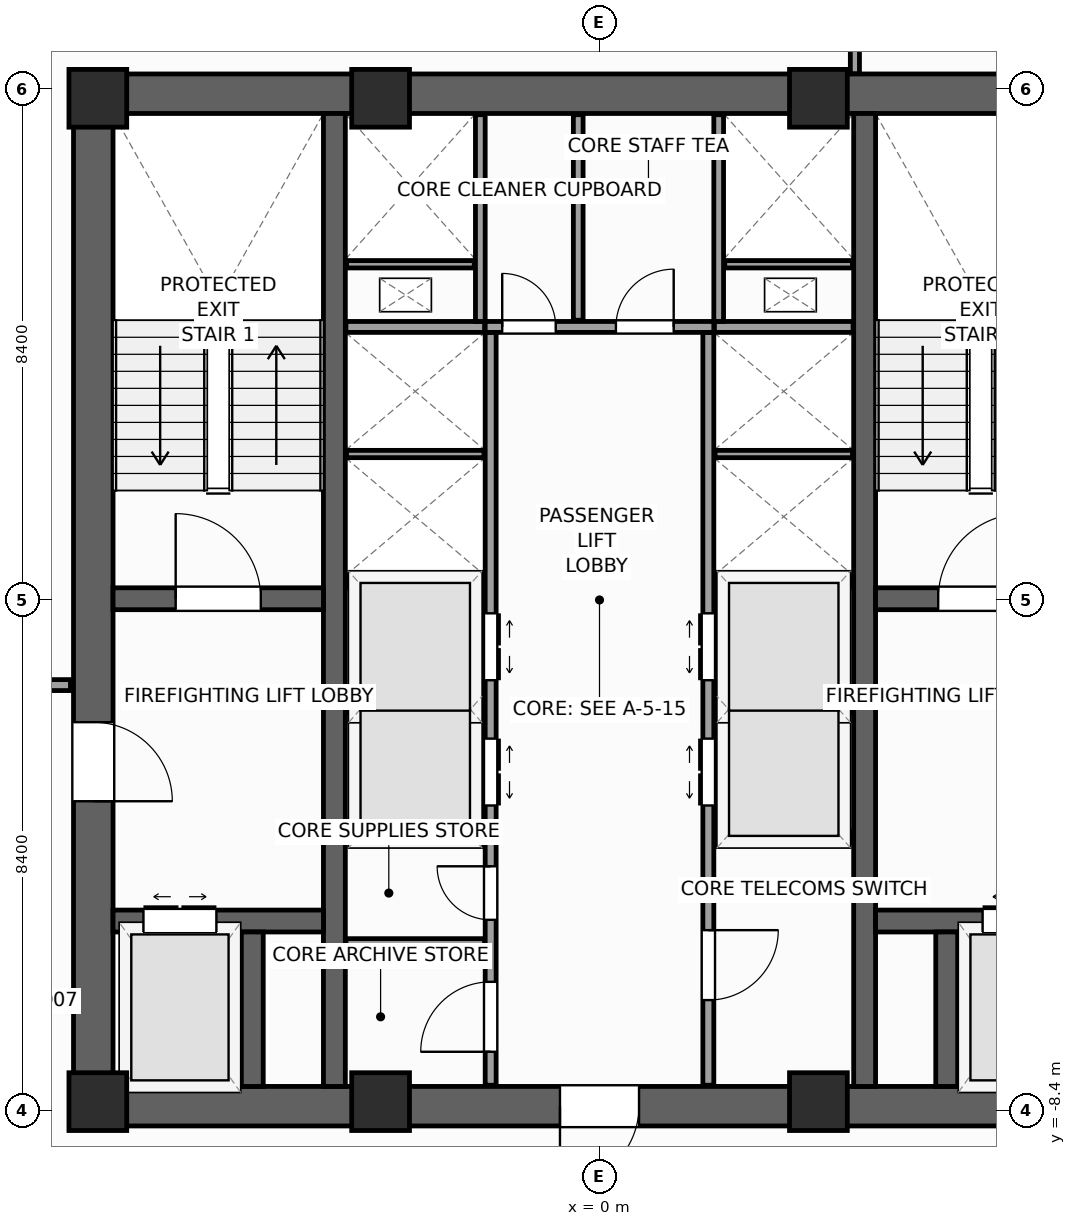
"""IFC4 building model, lengths in metres.
Left out: names, types, materials, properties, quantities, classifications, styles, units other than length and angle.
Written with IfcOpenShell. Run it as: python <this file> out.ifc"""

import sys

from ifc_helpers import new_model, si_unit, direction, frame, frame_2d, origin, origin_2d, place, context, subcontext, project, spatial, rectangle, extrude, source, transform, mapped, element, fill, save


model = new_model("IFC4")
c1 = context("Model", 3, precision=1e-05, world=origin(), true_north=direction((0.0, 1.0)))
c2 = subcontext(c1, "Body", "Model", "MODEL_VIEW")
j1 = project(units=[si_unit("LENGTHUNIT", "METRE"), si_unit("PLANEANGLEUNIT", "RADIAN")], contexts=[c1])
p1 = place(None, origin())
s1 = spatial("IfcSite", under=j1, at=p1, CompositionType="ELEMENT")
p2 = place(p1, origin())
s2 = spatial("IfcBuilding", under=s1, at=p2, CompositionType="ELEMENT")
p3 = place(p2, frame((0.0, 0.0, 168.4)))
s3 = spatial("IfcBuildingStorey", under=s2, at=p3, CompositionType="ELEMENT", Elevation=168.4)
p4 = place(p3, frame((-8.65, -8.325, 0.0), z_axis=(0.0, 0.0, 1.0), x_axis=(1.0, 0.0, 0.0)))
e1 = element("IfcWall", 1, at=p4, inside=s3, PredefinedType="SHEAR", context=c2, shape_type="SweptSolid", body=[
    extrude(rectangle(XDim=17.3, YDim=0.65, at=frame_2d((8.65, 0.0))), origin(), (0.0, 0.0, 1.0), 4.0),
])
p5 = place(p4, frame((8.0, 0.0, 0.0)))
e2 = element("IfcOpeningElement", 2, at=p5, cuts=e1, PredefinedType="OPENING", context=c2, shape_type="SweptSolid", body=[
    extrude(rectangle(XDim=1.3, YDim=2.2, at=frame_2d((0.65, 1.1))), frame((0.0, 0.335, 0.0), z_axis=(0.0, -1.0, 0.0), x_axis=(1.0, 0.0, 0.0)), (0.0, 0.0, 1.0), 0.67),
])
p6 = place(p3, frame((-8.65, 8.325, 0.0), z_axis=(0.0, 0.0, 1.0), x_axis=(1.0, 0.0, 0.0)))
e3 = element("IfcWall", 3, at=p6, inside=s3, PredefinedType="SHEAR", context=c2, shape_type="SweptSolid", body=[
    extrude(rectangle(XDim=17.3, YDim=0.65, at=frame_2d((8.65, 0.0))), origin(), (0.0, 0.0, 1.0), 4.0),
])
p7 = place(p3, frame((-8.325, -8.0, 0.0), z_axis=(0.0, 0.0, 1.0), x_axis=(0.0, 1.0, 0.0)))
e4 = element("IfcWall", 4, at=p7, inside=s3, PredefinedType="SHEAR", context=c2, shape_type="SweptSolid", body=[
    extrude(rectangle(XDim=16.0, YDim=0.65, at=frame_2d((8.0, 0.0))), origin(), (0.0, 0.0, 1.0), 4.0),
])
p8 = place(p7, frame((4.69, 0.0, 0.0)))
e5 = element("IfcOpeningElement", 5, at=p8, cuts=e4, PredefinedType="OPENING", context=c2, shape_type="SweptSolid", body=[
    extrude(rectangle(XDim=1.3, YDim=2.2, at=frame_2d((0.65, 1.1))), frame((0.0, 0.335, 0.0), z_axis=(0.0, -1.0, 0.0), x_axis=(1.0, 0.0, 0.0)), (0.0, 0.0, 1.0), 0.67),
])
for number, where, z_axis, x_axis in (
    (6, (-4.36, -8.0, 0.0), (0.0, 0.0, 1.0), (0.0, 1.0, 0.0)),
    (7, (4.36, -8.0, 0.0), (0.0, 0.0, 1.0), (0.0, 1.0, 0.0)),
):
    element("IfcWall", number, at=place(p3, frame(where, z_axis=z_axis, x_axis=x_axis)), inside=s3, PredefinedType="SHEAR", context=c2, shape_type="SweptSolid", body=[
        extrude(rectangle(XDim=16.0, YDim=0.36, at=frame_2d((8.0, 0.0))), origin(), (0.0, 0.0, 1.0), 4.0),
    ])
p9 = place(p3, frame((-8.0, 0.02, 0.0), z_axis=(0.0, 0.0, 1.0), x_axis=(1.0, 0.0, 0.0)))
e8 = element("IfcWall", 8, at=p9, inside=s3, PredefinedType="SHEAR", context=c2, shape_type="SweptSolid", body=[
    extrude(rectangle(XDim=3.46, YDim=0.36, at=frame_2d((1.73, 0.0))), origin(), (0.0, 0.0, 1.0), 4.0),
])
p10 = place(p9, frame((1.03, 0.0, 0.0)))
e9 = element("IfcOpeningElement", 9, at=p10, cuts=e8, PredefinedType="OPENING", context=c2, shape_type="SweptSolid", body=[
    extrude(rectangle(XDim=1.4, YDim=2.2, at=frame_2d((0.7, 1.1))), frame((0.0, 0.19, 0.0), z_axis=(0.0, -1.0, 0.0), x_axis=(1.0, 0.0, 0.0)), (0.0, 0.0, 1.0), 0.38),
])
p11 = place(p3, frame((4.54, 0.02, 0.0), z_axis=(0.0, 0.0, 1.0), x_axis=(1.0, 0.0, 0.0)))
e10 = element("IfcWall", 10, at=p11, inside=s3, PredefinedType="SHEAR", context=c2, shape_type="SweptSolid", body=[
    extrude(rectangle(XDim=3.46, YDim=0.36, at=frame_2d((1.73, 0.0))), origin(), (0.0, 0.0, 1.0), 4.0),
])
p12 = place(p11, frame((1.03, 0.0, 0.0)))
e11 = element("IfcOpeningElement", 11, at=p12, cuts=e10, PredefinedType="OPENING", context=c2, shape_type="SweptSolid", body=[
    extrude(rectangle(XDim=1.4, YDim=2.2, at=frame_2d((0.7, 1.1))), frame((0.0, 0.19, 0.0), z_axis=(0.0, -1.0, 0.0), x_axis=(1.0, 0.0, 0.0)), (0.0, 0.0, 1.0), 0.38),
])
p13 = place(p3, frame((-8.0, -5.28, 0.0), z_axis=(0.0, 0.0, 1.0), x_axis=(1.0, 0.0, 0.0)))
e12 = element("IfcWall", 12, at=p13, inside=s3, PredefinedType="SHEAR", context=c2, shape_type="SweptSolid", body=[
    extrude(rectangle(XDim=3.46, YDim=0.36, at=frame_2d((1.73, 0.0))), origin(), (0.0, 0.0, 1.0), 4.0),
])
p14 = place(p13, frame((0.5, 0.0, 0.0)))
e13 = element("IfcOpeningElement", 13, at=p14, cuts=e12, PredefinedType="OPENING", context=c2, shape_type="SweptSolid", body=[
    extrude(rectangle(XDim=1.2, YDim=2.25, at=frame_2d((0.6, 1.125))), frame((0.0, 0.19, 0.0), z_axis=(0.0, -1.0, 0.0), x_axis=(1.0, 0.0, 0.0)), (0.0, 0.0, 1.0), 0.38),
])
p15 = place(p3, frame((4.54, -5.28, 0.0), z_axis=(0.0, 0.0, 1.0), x_axis=(1.0, 0.0, 0.0)))
e14 = element("IfcWall", 14, at=p15, inside=s3, PredefinedType="SHEAR", context=c2, shape_type="SweptSolid", body=[
    extrude(rectangle(XDim=3.46, YDim=0.36, at=frame_2d((1.73, 0.0))), origin(), (0.0, 0.0, 1.0), 4.0),
])
p16 = place(p15, frame((1.76, 0.0, 0.0)))
e15 = element("IfcOpeningElement", 15, at=p16, cuts=e14, PredefinedType="OPENING", context=c2, shape_type="SweptSolid", body=[
    extrude(rectangle(XDim=1.2, YDim=2.25, at=frame_2d((0.6, 1.125))), frame((0.0, 0.19, 0.0), z_axis=(0.0, -1.0, 0.0), x_axis=(1.0, 0.0, 0.0)), (0.0, 0.0, 1.0), 0.38),
])
for number, where, z_axis, x_axis in (
    (16, (-5.71, -8.0, 0.0), (0.0, 0.0, 1.0), (0.0, 1.0, 0.0)),
    (17, (5.71, -8.0, 0.0), (0.0, 0.0, 1.0), (0.0, 1.0, 0.0)),
):
    element("IfcWall", number, at=place(p3, frame(where, z_axis=z_axis, x_axis=x_axis)), inside=s3, PredefinedType="SHEAR", context=c2, shape_type="SweptSolid", body=[
        extrude(rectangle(XDim=2.54, YDim=0.36, at=frame_2d((1.27, 0.0))), origin(), (0.0, 0.0, 1.0), 4.0),
    ])
m1 = source(origin(), c2, "Body", "SweptSolid", [
    extrude(rectangle(XDim=0.95, YDim=0.95, at=origin_2d()), origin(), (0.0, 0.0, 1.0), 4.0),
])
for number, where, z_axis, x_axis in (
    (18, (-8.25, -8.25, 0.0), (0.0, 0.0, 1.0), (1.0, 0.0, 0.0)),
    (19, (-8.25, 8.25, 0.0), (0.0, 0.0, 1.0), (1.0, 0.0, 0.0)),
    (20, (-3.6, -8.25, 0.0), (0.0, 0.0, 1.0), (1.0, 0.0, 0.0)),
    (21, (3.6, -8.25, 0.0), (0.0, 0.0, 1.0), (1.0, 0.0, 0.0)),
    (22, (-3.6, 8.25, 0.0), (0.0, 0.0, 1.0), (1.0, 0.0, 0.0)),
    (23, (3.6, 8.25, 0.0), (0.0, 0.0, 1.0), (1.0, 0.0, 0.0)),
):
    element("IfcColumn", number, at=place(p3, frame(where, z_axis=z_axis, x_axis=x_axis)), inside=s3, PredefinedType="PILASTER", context=c2, shape_type="MappedRepresentation", body=[
        mapped(m1, transform((0.0, 0.0, 0.0), scale=1.0)),
    ])
p17 = place(p3, frame((-1.79, -7.98, 0.0), z_axis=(0.0, 0.0, 1.0), x_axis=(0.0, 1.0, 0.0)))
e24 = element("IfcWall", 24, at=p17, inside=s3, PredefinedType="PARTITIONING", context=c2, shape_type="SweptSolid", body=[
    extrude(rectangle(XDim=12.38, YDim=0.18, at=frame_2d((6.19, 0.0))), origin(), (0.0, 0.0, 1.0), 3.74),
])
p18 = place(p17, frame((4.6, 0.0, 0.0)))
e25 = element("IfcOpeningElement", 25, at=p18, cuts=e24, PredefinedType="OPENING", context=c2, shape_type="SweptSolid", body=[
    extrude(rectangle(XDim=1.1, YDim=2.2, at=frame_2d((0.55, 1.1))), frame((0.0, 0.1, 0.0), z_axis=(0.0, -1.0, 0.0), x_axis=(1.0, 0.0, 0.0)), (0.0, 0.0, 1.0), 0.2),
])
p19 = place(p17, frame((6.66, 0.0, 0.0)))
e26 = element("IfcOpeningElement", 26, at=p19, cuts=e24, PredefinedType="OPENING", context=c2, shape_type="SweptSolid", body=[
    extrude(rectangle(XDim=1.1, YDim=2.2, at=frame_2d((0.55, 1.1))), frame((0.0, 0.1, 0.0), z_axis=(0.0, -1.0, 0.0), x_axis=(1.0, 0.0, 0.0)), (0.0, 0.0, 1.0), 0.2),
])
p20 = place(p17, frame((0.55, 0.0, 0.0)))
e27 = element("IfcOpeningElement", 27, at=p20, cuts=e24, PredefinedType="OPENING", context=c2, shape_type="SweptSolid", body=[
    extrude(rectangle(XDim=1.15, YDim=2.25, at=frame_2d((0.575, 1.125))), frame((0.0, 0.1, 0.0), z_axis=(0.0, -1.0, 0.0), x_axis=(1.0, 0.0, 0.0)), (0.0, 0.0, 1.0), 0.2),
])
p21 = place(p17, frame((2.72, 0.0, 0.0)))
e28 = element("IfcOpeningElement", 28, at=p21, cuts=e24, PredefinedType="OPENING", context=c2, shape_type="SweptSolid", body=[
    extrude(rectangle(XDim=0.88, YDim=2.1, at=frame_2d((0.44, 1.05))), frame((0.0, 0.1, 0.0), z_axis=(0.0, -1.0, 0.0), x_axis=(1.0, 0.0, 0.0)), (0.0, 0.0, 1.0), 0.2),
])
p22 = place(p3, frame((1.79, -7.98, 0.0), z_axis=(0.0, 0.0, 1.0), x_axis=(0.0, 1.0, 0.0)))
e29 = element("IfcWall", 29, at=p22, inside=s3, PredefinedType="PARTITIONING", context=c2, shape_type="SweptSolid", body=[
    extrude(rectangle(XDim=12.38, YDim=0.18, at=frame_2d((6.19, 0.0))), origin(), (0.0, 0.0, 1.0), 3.74),
])
p23 = place(p22, frame((4.6, 0.0, 0.0)))
e30 = element("IfcOpeningElement", 30, at=p23, cuts=e29, PredefinedType="OPENING", context=c2, shape_type="SweptSolid", body=[
    extrude(rectangle(XDim=1.1, YDim=2.2, at=frame_2d((0.55, 1.1))), frame((0.0, 0.1, 0.0), z_axis=(0.0, -1.0, 0.0), x_axis=(1.0, 0.0, 0.0)), (0.0, 0.0, 1.0), 0.2),
])
p24 = place(p22, frame((6.66, 0.0, 0.0)))
e31 = element("IfcOpeningElement", 31, at=p24, cuts=e29, PredefinedType="OPENING", context=c2, shape_type="SweptSolid", body=[
    extrude(rectangle(XDim=1.1, YDim=2.2, at=frame_2d((0.55, 1.1))), frame((0.0, 0.1, 0.0), z_axis=(0.0, -1.0, 0.0), x_axis=(1.0, 0.0, 0.0)), (0.0, 0.0, 1.0), 0.2),
])
p25 = place(p22, frame((1.4, 0.0, 0.0)))
e32 = element("IfcOpeningElement", 32, at=p25, cuts=e29, PredefinedType="OPENING", context=c2, shape_type="SweptSolid", body=[
    extrude(rectangle(XDim=1.15, YDim=2.25, at=frame_2d((0.575, 1.125))), frame((0.0, 0.1, 0.0), z_axis=(0.0, -1.0, 0.0), x_axis=(1.0, 0.0, 0.0)), (0.0, 0.0, 1.0), 0.2),
])
p26 = place(p3, frame((-1.88, 4.49, 0.0), z_axis=(0.0, 0.0, 1.0), x_axis=(1.0, 0.0, 0.0)))
e33 = element("IfcWall", 33, at=p26, inside=s3, PredefinedType="PARTITIONING", context=c2, shape_type="SweptSolid", body=[
    extrude(rectangle(XDim=3.76, YDim=0.18, at=frame_2d((1.88, 0.0))), origin(), (0.0, 0.0, 1.0), 3.74),
])
p27 = place(p26, frame((0.28, 0.0, 0.0)))
e34 = element("IfcOpeningElement", 34, at=p27, cuts=e33, PredefinedType="OPENING", context=c2, shape_type="SweptSolid", body=[
    extrude(rectangle(XDim=0.88, YDim=2.1, at=frame_2d((0.44, 1.05))), frame((0.0, 0.1, 0.0), z_axis=(0.0, -1.0, 0.0), x_axis=(1.0, 0.0, 0.0)), (0.0, 0.0, 1.0), 0.2),
])
p28 = place(p26, frame((2.15, 0.0, 0.0)))
e35 = element("IfcOpeningElement", 35, at=p28, cuts=e33, PredefinedType="OPENING", context=c2, shape_type="SweptSolid", body=[
    extrude(rectangle(XDim=0.95, YDim=2.1, at=frame_2d((0.475, 1.05))), frame((0.0, 0.1, 0.0), z_axis=(0.0, -1.0, 0.0), x_axis=(1.0, 0.0, 0.0)), (0.0, 0.0, 1.0), 0.2),
])
for number, where, z_axis, x_axis in (
    (36, (-4.17, -3.9, 0.0), (0.0, 0.0, 1.0), (1.0, 0.0, 0.0)),
    (37, (1.89, -3.9, 0.0), (0.0, 0.0, 1.0), (1.0, 0.0, 0.0)),
    (38, (-4.17, 0.3, 0.0), (0.0, 0.0, 1.0), (1.0, 0.0, 0.0)),
    (39, (1.89, 0.3, 0.0), (0.0, 0.0, 1.0), (1.0, 0.0, 0.0)),
    (40, (-4.17, 4.49, 0.0), (0.0, 0.0, 1.0), (1.0, 0.0, 0.0)),
    (41, (1.89, 4.49, 0.0), (0.0, 0.0, 1.0), (1.0, 0.0, 0.0)),
):
    element("IfcWall", number, at=place(p3, frame(where, z_axis=z_axis, x_axis=x_axis)), inside=s3, PredefinedType="PARTITIONING", context=c2, shape_type="SweptSolid", body=[
        extrude(rectangle(XDim=2.28, YDim=0.18, at=frame_2d((1.14, 0.0))), origin(), (0.0, 0.0, 1.0), 3.74),
    ])
for number, where, z_axis, x_axis in (
    (42, (-4.16, -1.8, 0.0), (0.0, 0.0, 1.0), (1.0, 0.0, 0.0)),
    (43, (1.9, -1.8, 0.0), (0.0, 0.0, 1.0), (1.0, 0.0, 0.0)),
    (44, (-4.16, 2.4, 0.0), (0.0, 0.0, 1.0), (1.0, 0.0, 0.0)),
    (45, (1.9, 2.4, 0.0), (0.0, 0.0, 1.0), (1.0, 0.0, 0.0)),
):
    element("IfcWall", number, at=place(p3, frame(where, z_axis=z_axis, x_axis=x_axis)), inside=s3, PredefinedType="PARTITIONING", context=c2, shape_type="SweptSolid", body=[
        extrude(rectangle(XDim=2.26, YDim=0.12, at=frame_2d((1.13, 0.0))), origin(), (0.0, 0.0, 1.0), 3.74),
    ])
p29 = place(p3, frame((-4.17, -5.65, 0.0), z_axis=(0.0, 0.0, 1.0), x_axis=(1.0, 0.0, 0.0)))
e46 = element("IfcWall", 46, at=p29, inside=s3, PredefinedType="PARTITIONING", context=c2, shape_type="SweptSolid", body=[
    extrude(rectangle(XDim=2.28, YDim=0.16, at=frame_2d((1.14, 0.0))), origin(), (0.0, 0.0, 1.0), 3.74),
])
for number, where, z_axis, x_axis in (
    (47, (-1.96, 4.58, 0.0), (0.0, 0.0, 1.0), (0.0, 1.0, 0.0)),
    (48, (1.96, 4.58, 0.0), (0.0, 0.0, 1.0), (0.0, 1.0, 0.0)),
):
    element("IfcWall", number, at=place(p3, frame(where, z_axis=z_axis, x_axis=x_axis)), inside=s3, PredefinedType="PARTITIONING", context=c2, shape_type="SweptSolid", body=[
        extrude(rectangle(XDim=3.4, YDim=0.16, at=frame_2d((1.7, 0.0))), origin(), (0.0, 0.0, 1.0), 3.74),
    ])
for number, where, z_axis, x_axis in (
    (49, (-4.16, 5.52, 0.0), (0.0, 0.0, 1.0), (1.0, 0.0, 0.0)),
    (50, (2.06, 5.52, 0.0), (0.0, 0.0, 1.0), (1.0, 0.0, 0.0)),
):
    element("IfcWall", number, at=place(p3, frame(where, z_axis=z_axis, x_axis=x_axis)), inside=s3, PredefinedType="PARTITIONING", context=c2, shape_type="SweptSolid", body=[
        extrude(rectangle(XDim=2.1, YDim=0.12, at=frame_2d((1.05, 0.0))), origin(), (0.0, 0.0, 1.0), 3.74),
    ])
p30 = place(p3, frame((-0.35, 4.6, 0.0), z_axis=(0.0, 0.0, 1.0), x_axis=(0.0, 1.0, 0.0)))
e51 = element("IfcWall", 51, at=p30, inside=s3, PredefinedType="PARTITIONING", context=c2, shape_type="SweptSolid", body=[
    extrude(rectangle(XDim=3.38, YDim=0.16, at=frame_2d((1.69, 0.0))), origin(), (0.0, 0.0, 1.0), 3.74),
])
p31 = place(p3, frame((-10.45, -1.4, 0.0), z_axis=(0.0, 0.0, 1.0), x_axis=(1.0, 0.0, 0.0)))
e52 = element("IfcWall", 52, at=p31, inside=s3, PredefinedType="PARTITIONING", context=c2, shape_type="SweptSolid", body=[
    extrude(rectangle(XDim=1.75, YDim=0.18, at=frame_2d((0.875, 0.0))), origin(), (0.0, 0.0, 1.0), 3.74),
])
p32 = place(p31, frame((0.325, 0.0, 0.0)))
e53 = element("IfcOpeningElement", 53, at=p32, cuts=e52, PredefinedType="OPENING", context=c2, shape_type="SweptSolid", body=[
    extrude(rectangle(XDim=1.1, YDim=2.2, at=frame_2d((0.55, 1.1))), frame((0.0, 0.1, 0.0), z_axis=(0.0, -1.0, 0.0), x_axis=(1.0, 0.0, 0.0)), (0.0, 0.0, 1.0), 0.2),
])
p33 = place(p3, frame((4.2, 8.655, 0.0), z_axis=(0.0, 0.0, 1.0), x_axis=(0.0, 1.0, 0.0)))
e54 = element("IfcWall", 54, at=p33, inside=s3, PredefinedType="PARTITIONING", context=c2, shape_type="SweptSolid", body=[
    extrude(rectangle(XDim=21.286, YDim=0.15, at=frame_2d((10.643, 0.0))), origin(), (0.0, 0.0, 1.0), 3.74),
])
m2 = source(origin(), c2, "Body", "SweptSolid", [
    extrude(rectangle(XDim=1.4, YDim=2.2, at=frame_2d((0.7, 1.1))), frame((0.0, 0.025, 0.0), z_axis=(0.0, -1.0, 0.0), x_axis=(1.0, 0.0, 0.0)), (0.0, 0.0, 1.0), 0.05),
])
p34 = place(p10, origin())
e55 = element("IfcDoor", 55, at=p34, inside=s3, OperationType="SINGLE_SWING_LEFT", PredefinedType="DOOR", context=c2, shape_type="MappedRepresentation", body=[
    mapped(m2, transform((0.0, 0.0, 0.0), scale=1.0)),
])
fill(e9, e55)
p35 = place(p12, origin())
e56 = element("IfcDoor", 56, at=p35, inside=s3, OperationType="SINGLE_SWING_RIGHT", PredefinedType="DOOR", context=c2, shape_type="MappedRepresentation", body=[
    mapped(m2, transform((0.0, 0.0, 0.0), scale=1.0)),
])
fill(e11, e56)
m3 = source(origin(), c2, "Body", "SweptSolid", [
    extrude(rectangle(XDim=1.3, YDim=2.2, at=frame_2d((0.65, 1.1))), frame((0.0, 0.025, 0.0), z_axis=(0.0, -1.0, 0.0), x_axis=(1.0, 0.0, 0.0)), (0.0, 0.0, 1.0), 0.05),
])
p36 = place(p8, frame((1.3, 0.0, 0.0), z_axis=(0.0, 0.0, 1.0), x_axis=(-1.0, 0.0, 0.0)))
e57 = element("IfcDoor", 57, at=p36, inside=s3, OperationType="SINGLE_SWING_LEFT", PredefinedType="DOOR", context=c2, shape_type="MappedRepresentation", body=[
    mapped(m3, transform((0.0, 0.0, 0.0), scale=1.0)),
])
fill(e5, e57)
p37 = place(p5, frame((1.3, 0.0, 0.0), z_axis=(0.0, 0.0, 1.0), x_axis=(-1.0, 0.0, 0.0)))
e58 = element("IfcDoor", 58, at=p37, inside=s3, OperationType="SINGLE_SWING_LEFT", PredefinedType="DOOR", context=c2, shape_type="MappedRepresentation", body=[
    mapped(m3, transform((0.0, 0.0, 0.0), scale=1.0)),
])
fill(e2, e58)
m4 = source(origin(), c2, "Body", "SweptSolid", [
    extrude(rectangle(XDim=1.2, YDim=2.25, at=frame_2d((0.6, 1.125))), frame((0.0, 0.025, 0.0), z_axis=(0.0, -1.0, 0.0), x_axis=(1.0, 0.0, 0.0)), (0.0, 0.0, 1.0), 0.05),
])
p38 = place(p14, origin())
e59 = element("IfcDoor", 59, at=p38, inside=s3, OperationType="DOUBLE_DOOR_SLIDING", PredefinedType="DOOR", context=c2, shape_type="MappedRepresentation", body=[
    mapped(m4, transform((0.0, 0.0, 0.0), scale=1.0)),
])
fill(e13, e59)
p39 = place(p16, origin())
e60 = element("IfcDoor", 60, at=p39, inside=s3, OperationType="DOUBLE_DOOR_SLIDING", PredefinedType="DOOR", context=c2, shape_type="MappedRepresentation", body=[
    mapped(m4, transform((0.0, 0.0, 0.0), scale=1.0)),
])
fill(e15, e60)
m5 = source(origin(), c2, "Body", "SweptSolid", [
    extrude(rectangle(XDim=1.1, YDim=2.2, at=frame_2d((0.55, 1.1))), frame((0.0, 0.025, 0.0), z_axis=(0.0, -1.0, 0.0), x_axis=(1.0, 0.0, 0.0)), (0.0, 0.0, 1.0), 0.05),
])
p40 = place(p18, frame((1.1, 0.0, 0.0), z_axis=(0.0, 0.0, 1.0), x_axis=(-1.0, 0.0, 0.0)))
e61 = element("IfcDoor", 61, at=p40, inside=s3, OperationType="DOUBLE_DOOR_SLIDING", PredefinedType="DOOR", context=c2, shape_type="MappedRepresentation", body=[
    mapped(m5, transform((0.0, 0.0, 0.0), scale=1.0)),
])
fill(e25, e61)
p41 = place(p19, frame((1.1, 0.0, 0.0), z_axis=(0.0, 0.0, 1.0), x_axis=(-1.0, 0.0, 0.0)))
e62 = element("IfcDoor", 62, at=p41, inside=s3, OperationType="DOUBLE_DOOR_SLIDING", PredefinedType="DOOR", context=c2, shape_type="MappedRepresentation", body=[
    mapped(m5, transform((0.0, 0.0, 0.0), scale=1.0)),
])
fill(e26, e62)
p42 = place(p23, origin())
e63 = element("IfcDoor", 63, at=p42, inside=s3, OperationType="DOUBLE_DOOR_SLIDING", PredefinedType="DOOR", context=c2, shape_type="MappedRepresentation", body=[
    mapped(m5, transform((0.0, 0.0, 0.0), scale=1.0)),
])
fill(e30, e63)
p43 = place(p24, origin())
e64 = element("IfcDoor", 64, at=p43, inside=s3, OperationType="DOUBLE_DOOR_SLIDING", PredefinedType="DOOR", context=c2, shape_type="MappedRepresentation", body=[
    mapped(m5, transform((0.0, 0.0, 0.0), scale=1.0)),
])
fill(e31, e64)
m6 = source(origin(), c2, "Body", "SweptSolid", [
    extrude(rectangle(XDim=1.15, YDim=2.25, at=frame_2d((0.575, 1.125))), frame((0.0, 0.025, 0.0), z_axis=(0.0, -1.0, 0.0), x_axis=(1.0, 0.0, 0.0)), (0.0, 0.0, 1.0), 0.05),
])
p44 = place(p20, origin())
e65 = element("IfcDoor", 65, at=p44, inside=s3, OperationType="SINGLE_SWING_LEFT", PredefinedType="DOOR", context=c2, shape_type="MappedRepresentation", body=[
    mapped(m6, transform((0.0, 0.0, 0.0), scale=1.0)),
])
fill(e27, e65)
m7 = source(origin(), c2, "Body", "SweptSolid", [
    extrude(rectangle(XDim=0.88, YDim=2.1, at=frame_2d((0.44, 1.05))), frame((0.0, 0.025, 0.0), z_axis=(0.0, -1.0, 0.0), x_axis=(1.0, 0.0, 0.0)), (0.0, 0.0, 1.0), 0.05),
])
p45 = place(p21, origin())
e66 = element("IfcDoor", 66, at=p45, inside=s3, OperationType="SINGLE_SWING_RIGHT", PredefinedType="DOOR", context=c2, shape_type="MappedRepresentation", body=[
    mapped(m7, transform((0.0, 0.0, 0.0), scale=1.0)),
])
fill(e28, e66)
p46 = place(p25, frame((1.15, 0.0, 0.0), z_axis=(0.0, 0.0, 1.0), x_axis=(-1.0, 0.0, 0.0)))
e67 = element("IfcDoor", 67, at=p46, inside=s3, OperationType="SINGLE_SWING_RIGHT", PredefinedType="DOOR", context=c2, shape_type="MappedRepresentation", body=[
    mapped(m6, transform((0.0, 0.0, 0.0), scale=1.0)),
])
fill(e32, e67)
p47 = place(p27, origin())
e68 = element("IfcDoor", 68, at=p47, inside=s3, OperationType="SINGLE_SWING_LEFT", PredefinedType="DOOR", context=c2, shape_type="MappedRepresentation", body=[
    mapped(m7, transform((0.0, 0.0, 0.0), scale=1.0)),
])
fill(e34, e68)
m8 = source(origin(), c2, "Body", "SweptSolid", [
    extrude(rectangle(XDim=0.95, YDim=2.1, at=frame_2d((0.475, 1.05))), frame((0.0, 0.025, 0.0), z_axis=(0.0, -1.0, 0.0), x_axis=(1.0, 0.0, 0.0)), (0.0, 0.0, 1.0), 0.05),
])
p48 = place(p28, origin())
e69 = element("IfcDoor", 69, at=p48, inside=s3, OperationType="SINGLE_SWING_RIGHT", PredefinedType="DOOR", context=c2, shape_type="MappedRepresentation", body=[
    mapped(m8, transform((0.0, 0.0, 0.0), scale=1.0)),
])
fill(e35, e69)
save(model, sys.argv[1])
